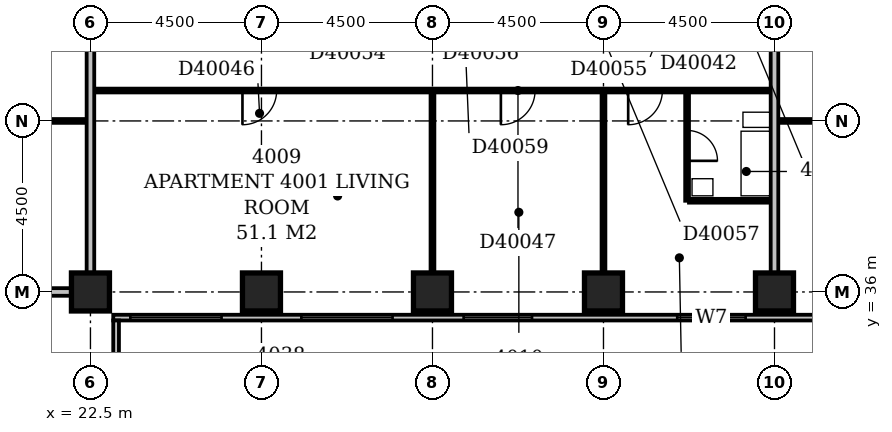
"""IFC4 building model, lengths in metres.
Left out: names, types, materials, properties, quantities, classifications, styles, units other than length and angle.
Written with IfcOpenShell. Run it as: python <this file> out.ifc"""

import sys

from ifc_helpers import new_model, si_unit, direction, frame, frame_2d, origin, origin_2d, place, context, subcontext, project, spatial, rectangle, extrude, element, fill, save


model = new_model("IFC4")
c1 = context("Model", 3, precision=1e-05, world=origin(), true_north=direction((0.0, 1.0)))
c2 = subcontext(c1, "Body", "Model", "MODEL_VIEW")
j1 = project(units=[si_unit("LENGTHUNIT", "METRE"), si_unit("PLANEANGLEUNIT", "RADIAN")], contexts=[c1])
p1 = place(None, origin())
s1 = spatial("IfcSite", under=j1, at=p1, CompositionType="ELEMENT")
p2 = place(p1, origin())
s2 = spatial("IfcBuilding", under=s1, at=p2, CompositionType="ELEMENT")
p3 = place(p2, frame((0.0, 0.0, 159.2)))
s3 = spatial("IfcBuildingStorey", under=s2, at=p3, CompositionType="ELEMENT", Elevation=159.2)
for number, where, z_axis, x_axis in (
    (1, (22.5, 36.0, -0.3), (0.0, 0.0, 1.0), (1.0, 0.0, 0.0)),
    (2, (27.0, 36.0, -0.3), (0.0, 0.0, 1.0), (1.0, 0.0, 0.0)),
    (3, (31.5, 36.0, -0.3), (0.0, 0.0, 1.0), (1.0, 0.0, 0.0)),
    (4, (36.0, 36.0, -0.3), (0.0, 0.0, 1.0), (1.0, 0.0, 0.0)),
    (5, (40.5, 36.0, -0.3), (0.0, 0.0, 1.0), (1.0, 0.0, 0.0)),
):
    element("IfcColumn", number, at=place(p3, frame(where, z_axis=z_axis, x_axis=x_axis)), inside=s3, PredefinedType="COLUMN", context=c2, shape_type="SweptSolid", body=[
        extrude(rectangle(XDim=1.0, YDim=1.0, at=origin_2d()), origin(), (0.0, 0.0, 1.0), 3.6),
    ])
p4 = place(p3, frame((23.175, 17.4, 0.0), z_axis=(0.0, 0.0, 1.0), x_axis=(0.0, 1.0, 0.0)))
e6 = element("IfcWall", 6, at=p4, inside=s3, PredefinedType="STANDARD", context=c2, shape_type="SweptSolid", body=[
    extrude(rectangle(XDim=17.85, YDim=0.15, at=frame_2d((8.925, 0.0))), origin(), (0.0, 0.0, 1.0), 2.7),
])
p5 = place(p4, frame((1.65, 0.0, 0.6)))
e7 = element("IfcOpeningElement", 7, at=p5, cuts=e6, PredefinedType="OPENING", context=c2, shape_type="SweptSolid", body=[
    extrude(rectangle(XDim=2.4, YDim=1.8, at=frame_2d((1.2, 0.9))), frame((0.0, 0.087, 0.0), z_axis=(0.0, -1.0, 0.0), x_axis=(1.0, 0.0, 0.0)), (0.0, 0.0, 1.0), 0.174),
])
p6 = place(p4, frame((6.15, 0.0, 0.6)))
e8 = element("IfcOpeningElement", 8, at=p6, cuts=e6, PredefinedType="OPENING", context=c2, shape_type="SweptSolid", body=[
    extrude(rectangle(XDim=2.4, YDim=1.8, at=frame_2d((1.2, 0.9))), frame((0.0, 0.087, 0.0), z_axis=(0.0, -1.0, 0.0), x_axis=(1.0, 0.0, 0.0)), (0.0, 0.0, 1.0), 0.174),
])
p7 = place(p4, frame((10.65, 0.0, 0.6)))
e9 = element("IfcOpeningElement", 9, at=p7, cuts=e6, PredefinedType="OPENING", context=c2, shape_type="SweptSolid", body=[
    extrude(rectangle(XDim=2.4, YDim=1.8, at=frame_2d((1.2, 0.9))), frame((0.0, 0.087, 0.0), z_axis=(0.0, -1.0, 0.0), x_axis=(1.0, 0.0, 0.0)), (0.0, 0.0, 1.0), 0.174),
])
p8 = place(p4, frame((14.82, 0.0, 0.6)))
e10 = element("IfcOpeningElement", 10, at=p8, cuts=e6, PredefinedType="OPENING", context=c2, shape_type="SweptSolid", body=[
    extrude(rectangle(XDim=0.45, YDim=1.8, at=frame_2d((0.225, 0.9))), frame((0.0, 0.087, 0.0), z_axis=(0.0, -1.0, 0.0), x_axis=(1.0, 0.0, 0.0)), (0.0, 0.0, 1.0), 0.174),
])
p9 = place(p3, frame((23.1, 35.325, 0.0), z_axis=(0.0, 0.0, 1.0), x_axis=(1.0, 0.0, 0.0)))
e11 = element("IfcWall", 11, at=p9, inside=s3, PredefinedType="STANDARD", context=c2, shape_type="SweptSolid", body=[
    extrude(rectangle(XDim=45.15, YDim=0.15, at=frame_2d((22.575, 0.0))), origin(), (0.0, 0.0, 1.0), 2.7),
])
p10 = place(p9, frame((0.45, 0.0, 0.6)))
e12 = element("IfcOpeningElement", 12, at=p10, cuts=e11, PredefinedType="OPENING", context=c2, shape_type="SweptSolid", body=[
    extrude(rectangle(XDim=2.4, YDim=1.8, at=frame_2d((1.2, 0.9))), frame((0.0, 0.087, 0.0), z_axis=(0.0, -1.0, 0.0), x_axis=(1.0, 0.0, 0.0)), (0.0, 0.0, 1.0), 0.174),
])
p11 = place(p9, frame((4.95, 0.0, 0.6)))
e13 = element("IfcOpeningElement", 13, at=p11, cuts=e11, PredefinedType="OPENING", context=c2, shape_type="SweptSolid", body=[
    extrude(rectangle(XDim=2.4, YDim=1.8, at=frame_2d((1.2, 0.9))), frame((0.0, 0.087, 0.0), z_axis=(0.0, -1.0, 0.0), x_axis=(1.0, 0.0, 0.0)), (0.0, 0.0, 1.0), 0.174),
])
p12 = place(p9, frame((9.22, 0.0, 0.6)))
e14 = element("IfcOpeningElement", 14, at=p12, cuts=e11, PredefinedType="OPENING", context=c2, shape_type="SweptSolid", body=[
    extrude(rectangle(XDim=1.8, YDim=1.8, at=frame_2d((0.9, 0.9))), frame((0.0, 0.087, 0.0), z_axis=(0.0, -1.0, 0.0), x_axis=(1.0, 0.0, 0.0)), (0.0, 0.0, 1.0), 0.174),
])
p13 = place(p9, frame((14.84, 0.0, 0.6)))
e15 = element("IfcOpeningElement", 15, at=p13, cuts=e11, PredefinedType="OPENING", context=c2, shape_type="SweptSolid", body=[
    extrude(rectangle(XDim=1.8, YDim=1.8, at=frame_2d((0.9, 0.9))), frame((0.0, 0.087, 0.0), z_axis=(0.0, -1.0, 0.0), x_axis=(1.0, 0.0, 0.0)), (0.0, 0.0, 1.0), 0.174),
])
p14 = place(p9, frame((18.45, 0.0, 0.6)))
e16 = element("IfcOpeningElement", 16, at=p14, cuts=e11, PredefinedType="OPENING", context=c2, shape_type="SweptSolid", body=[
    extrude(rectangle(XDim=2.4, YDim=1.8, at=frame_2d((1.2, 0.9))), frame((0.0, 0.087, 0.0), z_axis=(0.0, -1.0, 0.0), x_axis=(1.0, 0.0, 0.0)), (0.0, 0.0, 1.0), 0.174),
])
p15 = place(p9, frame((22.95, 0.0, 0.6)))
e17 = element("IfcOpeningElement", 17, at=p15, cuts=e11, PredefinedType="OPENING", context=c2, shape_type="SweptSolid", body=[
    extrude(rectangle(XDim=2.4, YDim=1.8, at=frame_2d((1.2, 0.9))), frame((0.0, 0.087, 0.0), z_axis=(0.0, -1.0, 0.0), x_axis=(1.0, 0.0, 0.0)), (0.0, 0.0, 1.0), 0.174),
])
p16 = place(p9, frame((27.45, 0.0, 0.6)))
e18 = element("IfcOpeningElement", 18, at=p16, cuts=e11, PredefinedType="OPENING", context=c2, shape_type="SweptSolid", body=[
    extrude(rectangle(XDim=2.4, YDim=1.8, at=frame_2d((1.2, 0.9))), frame((0.0, 0.087, 0.0), z_axis=(0.0, -1.0, 0.0), x_axis=(1.0, 0.0, 0.0)), (0.0, 0.0, 1.0), 0.174),
])
p17 = place(p9, frame((31.95, 0.0, 0.6)))
e19 = element("IfcOpeningElement", 19, at=p17, cuts=e11, PredefinedType="OPENING", context=c2, shape_type="SweptSolid", body=[
    extrude(rectangle(XDim=2.4, YDim=1.8, at=frame_2d((1.2, 0.9))), frame((0.0, 0.087, 0.0), z_axis=(0.0, -1.0, 0.0), x_axis=(1.0, 0.0, 0.0)), (0.0, 0.0, 1.0), 0.174),
])
p18 = place(p9, frame((36.45, 0.0, 0.6)))
e20 = element("IfcOpeningElement", 20, at=p18, cuts=e11, PredefinedType="OPENING", context=c2, shape_type="SweptSolid", body=[
    extrude(rectangle(XDim=2.4, YDim=1.8, at=frame_2d((1.2, 0.9))), frame((0.0, 0.087, 0.0), z_axis=(0.0, -1.0, 0.0), x_axis=(1.0, 0.0, 0.0)), (0.0, 0.0, 1.0), 0.174),
])
p19 = place(p9, frame((40.689, 0.0, 0.6)))
e21 = element("IfcOpeningElement", 21, at=p19, cuts=e11, PredefinedType="OPENING", context=c2, shape_type="SweptSolid", body=[
    extrude(rectangle(XDim=1.2, YDim=1.8, at=frame_2d((0.6, 0.9))), frame((0.0, 0.087, 0.0), z_axis=(0.0, -1.0, 0.0), x_axis=(1.0, 0.0, 0.0)), (0.0, 0.0, 1.0), 0.174),
])
for number, where, z_axis, x_axis in (
    (22, (9.1, 36.0, 0.0), (0.0, 0.0, 1.0), (1.0, 0.0, 0.0)),
    (23, (22.5, 36.5, 0.0), (0.0, 0.0, 1.0), (0.0, 1.0, 0.0)),
):
    element("IfcWall", number, at=place(p3, frame(where, z_axis=z_axis, x_axis=x_axis)), inside=s3, PredefinedType="PARTITIONING", context=c2, shape_type="SweptSolid", body=[
        extrude(rectangle(XDim=12.9, YDim=0.2, at=frame_2d((6.45, 0.0))), origin(), (0.0, 0.0, 1.0), 3.3),
    ])
p20 = place(p3, frame((31.5, 36.5, 0.0), z_axis=(0.0, 0.0, 1.0), x_axis=(0.0, 1.0, 0.0)))
e24 = element("IfcWall", 24, at=p20, inside=s3, PredefinedType="PARTITIONING", context=c2, shape_type="SweptSolid", body=[
    extrude(rectangle(XDim=4.75, YDim=0.1, at=frame_2d((2.375, 0.0))), origin(), (0.0, 0.0, 1.0), 3.3),
])
p21 = place(p3, frame((36.0, 36.5, 0.0), z_axis=(0.0, 0.0, 1.0), x_axis=(0.0, 1.0, 0.0)))
e25 = element("IfcWall", 25, at=p21, inside=s3, PredefinedType="PARTITIONING", context=c2, shape_type="SweptSolid", body=[
    extrude(rectangle(XDim=4.75, YDim=0.1, at=frame_2d((2.375, 0.0))), origin(), (0.0, 0.0, 1.0), 2.4),
])
p22 = place(p3, frame((40.5, 36.5, 0.0), z_axis=(0.0, 0.0, 1.0), x_axis=(0.0, 1.0, 0.0)))
e26 = element("IfcWall", 26, at=p22, inside=s3, PredefinedType="PARTITIONING", context=c2, shape_type="SweptSolid", body=[
    extrude(rectangle(XDim=12.9, YDim=0.2, at=frame_2d((6.45, 0.0))), origin(), (0.0, 0.0, 1.0), 3.3),
])
p23 = place(p3, frame((38.2, 38.4, 0.0), z_axis=(0.0, 0.0, 1.0), x_axis=(0.0, 1.0, 0.0)))
e27 = element("IfcWall", 27, at=p23, inside=s3, PredefinedType="PLUMBINGWALL", context=c2, shape_type="SweptSolid", body=[
    extrude(rectangle(XDim=2.85, YDim=0.1, at=frame_2d((1.425, 0.0))), origin(), (0.0, 0.0, 1.0), 3.3),
])
p24 = place(p23, frame((1.05, 0.0, 0.0)))
e28 = element("IfcOpeningElement", 28, at=p24, cuts=e27, PredefinedType="OPENING", context=c2, shape_type="SweptSolid", body=[
    extrude(rectangle(XDim=0.8, YDim=2.1, at=frame_2d((0.4, 1.05))), frame((0.0, 0.062, 0.0), z_axis=(0.0, -1.0, 0.0), x_axis=(1.0, 0.0, 0.0)), (0.0, 0.0, 1.0), 0.124),
])
p25 = place(p3, frame((38.25, 38.4, 0.0), z_axis=(0.0, 0.0, 1.0), x_axis=(1.0, 0.0, 0.0)))
e29 = element("IfcWall", 29, at=p25, inside=s3, PredefinedType="PLUMBINGWALL", context=c2, shape_type="SweptSolid", body=[
    extrude(rectangle(XDim=2.15, YDim=0.1, at=frame_2d((1.075, 0.0))), origin(), (0.0, 0.0, 1.0), 3.3),
])
p26 = place(p3, frame((9.1, 40.5, 0.0), z_axis=(0.0, 0.0, 1.0), x_axis=(1.0, 0.0, 0.0)))
e30 = element("IfcWall", 30, at=p26, inside=s3, PredefinedType="PARTITIONING", context=c2, shape_type="SweptSolid", body=[
    extrude(rectangle(XDim=13.3, YDim=0.1, at=frame_2d((6.65, 0.0))), origin(), (0.0, 0.0, 1.0), 3.3),
])
p27 = place(p3, frame((40.6, 40.5, 0.0), z_axis=(0.0, 0.0, 1.0), x_axis=(1.0, 0.0, 0.0)))
e31 = element("IfcWall", 31, at=p27, inside=s3, PredefinedType="PARTITIONING", context=c2, shape_type="SweptSolid", body=[
    extrude(rectangle(XDim=4.3, YDim=0.1, at=frame_2d((2.15, 0.0))), origin(), (0.0, 0.0, 1.0), 3.3),
])
p28 = place(p27, frame((1.7, 0.0, 0.0)))
e32 = element("IfcOpeningElement", 32, at=p28, cuts=e31, PredefinedType="OPENING", context=c2, shape_type="SweptSolid", body=[
    extrude(rectangle(XDim=0.9, YDim=2.1, at=frame_2d((0.45, 1.05))), frame((0.0, 0.062, 0.0), z_axis=(0.0, -1.0, 0.0), x_axis=(1.0, 0.0, 0.0)), (0.0, 0.0, 1.0), 0.124),
])
p29 = place(p3, frame((22.6, 41.3, 0.0), z_axis=(0.0, 0.0, 1.0), x_axis=(1.0, 0.0, 0.0)))
e33 = element("IfcWall", 33, at=p29, inside=s3, PredefinedType="PARTITIONING", context=c2, shape_type="SweptSolid", body=[
    extrude(rectangle(XDim=17.8, YDim=0.1, at=frame_2d((8.9, 0.0))), origin(), (0.0, 0.0, 1.0), 3.3),
])
p30 = place(p29, frame((3.9, 0.0, 0.0)))
e34 = element("IfcOpeningElement", 34, at=p30, cuts=e33, PredefinedType="OPENING", context=c2, shape_type="SweptSolid", body=[
    extrude(rectangle(XDim=0.9, YDim=2.1, at=frame_2d((0.45, 1.05))), frame((0.0, 0.062, 0.0), z_axis=(0.0, -1.0, 0.0), x_axis=(1.0, 0.0, 0.0)), (0.0, 0.0, 1.0), 0.124),
])
p31 = place(p29, frame((10.7, 0.0, 0.0)))
e35 = element("IfcOpeningElement", 35, at=p31, cuts=e33, PredefinedType="OPENING", context=c2, shape_type="SweptSolid", body=[
    extrude(rectangle(XDim=0.9, YDim=2.1, at=frame_2d((0.45, 1.05))), frame((0.0, 0.062, 0.0), z_axis=(0.0, -1.0, 0.0), x_axis=(1.0, 0.0, 0.0)), (0.0, 0.0, 1.0), 0.124),
])
p32 = place(p29, frame((14.05, 0.0, 0.0)))
e36 = element("IfcOpeningElement", 36, at=p32, cuts=e33, PredefinedType="OPENING", context=c2, shape_type="SweptSolid", body=[
    extrude(rectangle(XDim=0.9, YDim=2.1, at=frame_2d((0.45, 1.05))), frame((0.0, 0.062, 0.0), z_axis=(0.0, -1.0, 0.0), x_axis=(1.0, 0.0, 0.0)), (0.0, 0.0, 1.0), 0.124),
])
p33 = place(p10, origin())
e37 = element("IfcWindow", 37, at=p33, inside=s3, PartitioningType="SINGLE_PANEL", PredefinedType="WINDOW", context=c2, shape_type="SweptSolid", body=[
    extrude(rectangle(XDim=2.4, YDim=1.8, at=frame_2d((1.2, 0.9))), frame((0.0, 0.03, 0.0), z_axis=(0.0, -1.0, 0.0), x_axis=(1.0, 0.0, 0.0)), (0.0, 0.0, 1.0), 0.06),
])
fill(e12, e37)
p34 = place(p11, origin())
e38 = element("IfcWindow", 38, at=p34, inside=s3, PartitioningType="SINGLE_PANEL", PredefinedType="WINDOW", context=c2, shape_type="SweptSolid", body=[
    extrude(rectangle(XDim=2.4, YDim=1.8, at=frame_2d((1.2, 0.9))), frame((0.0, 0.03, 0.0), z_axis=(0.0, -1.0, 0.0), x_axis=(1.0, 0.0, 0.0)), (0.0, 0.0, 1.0), 0.06),
])
fill(e13, e38)
p35 = place(p12, origin())
e39 = element("IfcWindow", 39, at=p35, inside=s3, PartitioningType="SINGLE_PANEL", PredefinedType="WINDOW", context=c2, shape_type="SweptSolid", body=[
    extrude(rectangle(XDim=1.8, YDim=1.8, at=frame_2d((0.9, 0.9))), frame((0.0, 0.03, 0.0), z_axis=(0.0, -1.0, 0.0), x_axis=(1.0, 0.0, 0.0)), (0.0, 0.0, 1.0), 0.06),
])
fill(e14, e39)
p36 = place(p13, origin())
e40 = element("IfcWindow", 40, at=p36, inside=s3, PartitioningType="SINGLE_PANEL", PredefinedType="WINDOW", context=c2, shape_type="SweptSolid", body=[
    extrude(rectangle(XDim=1.8, YDim=1.8, at=frame_2d((0.9, 0.9))), frame((0.0, 0.03, 0.0), z_axis=(0.0, -1.0, 0.0), x_axis=(1.0, 0.0, 0.0)), (0.0, 0.0, 1.0), 0.06),
])
fill(e15, e40)
p37 = place(p24, frame((0.8, 0.0, 0.0), z_axis=(0.0, 0.0, 1.0), x_axis=(-1.0, 0.0, 0.0)))
e41 = element("IfcDoor", 41, at=p37, inside=s3, OperationType="SINGLE_SWING_RIGHT", PredefinedType="DOOR", context=c2, shape_type="SweptSolid", body=[
    extrude(rectangle(XDim=0.8, YDim=2.1, at=frame_2d((0.4, 1.05))), frame((0.0, 0.025, 0.0), z_axis=(0.0, -1.0, 0.0), x_axis=(1.0, 0.0, 0.0)), (0.0, 0.0, 1.0), 0.05),
])
fill(e28, e41)
p38 = place(p30, frame((0.9, 0.0, 0.0), z_axis=(0.0, 0.0, 1.0), x_axis=(-1.0, 0.0, 0.0)))
e42 = element("IfcDoor", 42, at=p38, inside=s3, OperationType="SINGLE_SWING_RIGHT", PredefinedType="DOOR", context=c2, shape_type="SweptSolid", body=[
    extrude(rectangle(XDim=0.9, YDim=2.1, at=frame_2d((0.45, 1.05))), frame((0.0, 0.025, 0.0), z_axis=(0.0, -1.0, 0.0), x_axis=(1.0, 0.0, 0.0)), (0.0, 0.0, 1.0), 0.05),
])
fill(e34, e42)
p39 = place(p31, frame((0.9, 0.0, 0.0), z_axis=(0.0, 0.0, 1.0), x_axis=(-1.0, 0.0, 0.0)))
e43 = element("IfcDoor", 43, at=p39, inside=s3, OperationType="SINGLE_SWING_RIGHT", PredefinedType="DOOR", context=c2, shape_type="SweptSolid", body=[
    extrude(rectangle(XDim=0.9, YDim=2.1, at=frame_2d((0.45, 1.05))), frame((0.0, 0.025, 0.0), z_axis=(0.0, -1.0, 0.0), x_axis=(1.0, 0.0, 0.0)), (0.0, 0.0, 1.0), 0.05),
])
fill(e35, e43)
p40 = place(p32, frame((0.9, 0.0, 0.0), z_axis=(0.0, 0.0, 1.0), x_axis=(-1.0, 0.0, 0.0)))
e44 = element("IfcDoor", 44, at=p40, inside=s3, OperationType="SINGLE_SWING_RIGHT", PredefinedType="DOOR", context=c2, shape_type="SweptSolid", body=[
    extrude(rectangle(XDim=0.9, YDim=2.1, at=frame_2d((0.45, 1.05))), frame((0.0, 0.025, 0.0), z_axis=(0.0, -1.0, 0.0), x_axis=(1.0, 0.0, 0.0)), (0.0, 0.0, 1.0), 0.05),
])
fill(e36, e44)
save(model, sys.argv[1])
